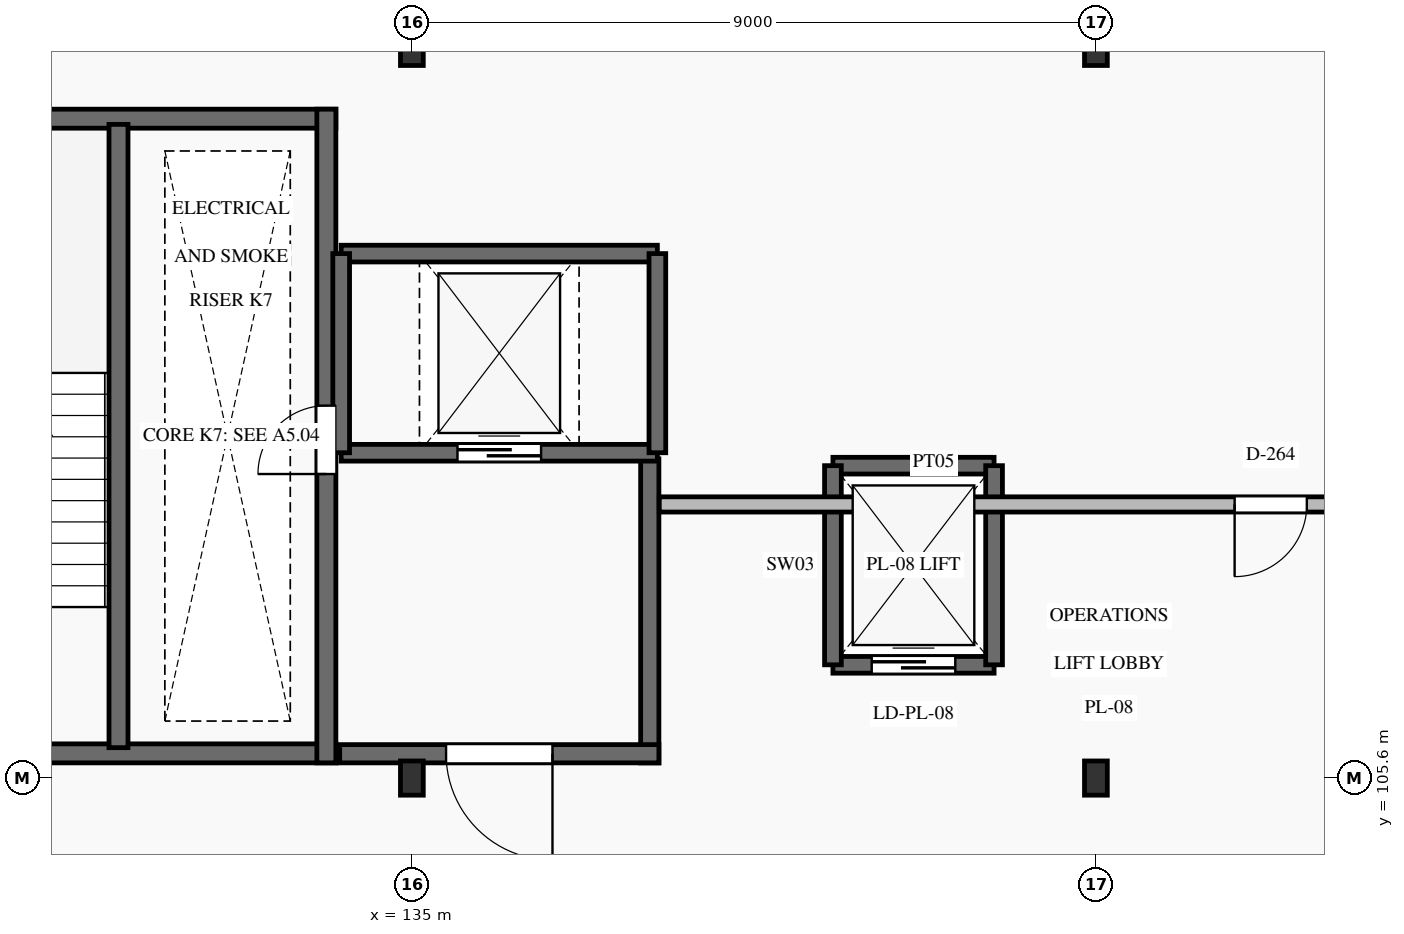
"""IFC4 building model, lengths in metres.
Left out: names, types, materials, properties, quantities, classifications, styles, units other than length and angle.
Written with IfcOpenShell. Run it as: python <this file> out.ifc"""

import sys

from ifc_helpers import new_model, si_unit, direction, frame, frame_2d, origin, origin_2d, place, context, subcontext, project, spatial, rectangle, i_section, extrude, element, fill, save


model = new_model("IFC4")
c1 = context("Model", 3, precision=1e-05, world=origin(), true_north=direction((0.0, 1.0)))
c2 = subcontext(c1, "Body", "Model", "MODEL_VIEW")
j1 = project(units=[si_unit("LENGTHUNIT", "METRE"), si_unit("PLANEANGLEUNIT", "RADIAN")], contexts=[c1])
p1 = place(None, origin())
s1 = spatial("IfcSite", under=j1, at=p1, CompositionType="ELEMENT")
p2 = place(p1, origin())
s2 = spatial("IfcBuilding", under=s1, at=p2, CompositionType="ELEMENT")
p3 = place(p2, frame((0.0, 0.0, 10.8)))
s3 = spatial("IfcBuildingStorey", under=s2, at=p3, CompositionType="ELEMENT", Elevation=10.8)
for number, where, z_axis, x_axis in (
    (1, (135.0, 105.6, 0.0), (0.0, 0.0, 1.0), (1.0, 0.0, 0.0)),
    (2, (135.0, 115.2, 0.0), (0.0, 0.0, 1.0), (1.0, 0.0, 0.0)),
    (3, (144.0, 105.6, 0.0), (0.0, 0.0, 1.0), (1.0, 0.0, 0.0)),
    (4, (144.0, 115.2, 0.0), (0.0, 0.0, 1.0), (1.0, 0.0, 0.0)),
):
    element("IfcColumn", number, at=place(p3, frame(where, z_axis=z_axis, x_axis=x_axis)), inside=s3, PredefinedType="COLUMN", context=c2, shape_type="SweptSolid", body=[
        extrude(i_section(OverallWidth=0.3, OverallDepth=0.45, WebThickness=0.014, FlangeThickness=0.026, FilletRadius=0.027, at=origin_2d()), origin(), (0.0, 0.0, 1.0), 4.2),
    ])
p4 = place(p3, frame((127.0, 105.925, 0.0), z_axis=(0.0, 0.0, 1.0), x_axis=(1.0, 0.0, 0.0)))
e5 = element("IfcWall", 5, at=p4, inside=s3, PredefinedType="SHEAR", context=c2, shape_type="SweptSolid", body=[
    extrude(rectangle(XDim=7.0, YDim=0.25, at=frame_2d((3.5, 0.0))), origin(), (0.0, 0.0, 1.0), 4.2),
])
p5 = place(p4, frame((1.25, 0.0, 0.0)))
e6 = element("IfcOpeningElement", 6, at=p5, cuts=e5, PredefinedType="OPENING", context=c2, shape_type="SweptSolid", body=[
    extrude(rectangle(XDim=1.2, YDim=2.15, at=frame_2d((0.6, 1.075))), frame((0.0, 0.14, 0.0), z_axis=(0.0, -1.0, 0.0), x_axis=(1.0, 0.0, 0.0)), (0.0, 0.0, 1.0), 0.28),
])
p6 = place(p3, frame((127.0, 114.275, 0.0), z_axis=(0.0, 0.0, 1.0), x_axis=(1.0, 0.0, 0.0)))
e7 = element("IfcWall", 7, at=p6, inside=s3, PredefinedType="SHEAR", context=c2, shape_type="SweptSolid", body=[
    extrude(rectangle(XDim=7.0, YDim=0.25, at=frame_2d((3.5, 0.0))), origin(), (0.0, 0.0, 1.0), 4.2),
])
p7 = place(p3, frame((133.875, 105.8, 0.0), z_axis=(0.0, 0.0, 1.0), x_axis=(0.0, 1.0, 0.0)))
e8 = element("IfcWall", 8, at=p7, inside=s3, PredefinedType="SHEAR", context=c2, shape_type="SweptSolid", body=[
    extrude(rectangle(XDim=8.6, YDim=0.25, at=frame_2d((4.3, 0.0))), origin(), (0.0, 0.0, 1.0), 4.2),
])
p8 = place(p7, frame((3.8, 0.0, 0.0)))
e9 = element("IfcOpeningElement", 9, at=p8, cuts=e8, PredefinedType="OPENING", context=c2, shape_type="SweptSolid", body=[
    extrude(rectangle(XDim=0.9, YDim=2.05, at=frame_2d((0.45, 1.025))), frame((0.0, 0.14, 0.0), z_axis=(0.0, -1.0, 0.0), x_axis=(1.0, 0.0, 0.0)), (0.0, 0.0, 1.0), 0.28),
])
p9 = place(p3, frame((131.14, 106.0, 0.0), z_axis=(0.0, 0.0, 1.0), x_axis=(0.0, 1.0, 0.0)))
e10 = element("IfcWall", 10, at=p9, inside=s3, PredefinedType="SHEAR", context=c2, shape_type="SweptSolid", body=[
    extrude(rectangle(XDim=8.2, YDim=0.25, at=frame_2d((4.1, 0.0))), origin(), (0.0, 0.0, 1.0), 4.2),
])
p10 = place(p3, frame((138.13, 105.8, 0.0), z_axis=(0.0, 0.0, 1.0), x_axis=(0.0, 1.0, 0.0)))
e11 = element("IfcWall", 11, at=p10, inside=s3, PredefinedType="SHEAR", context=c2, shape_type="SweptSolid", body=[
    extrude(rectangle(XDim=4.0, YDim=0.24, at=frame_2d((2.0, 0.0))), origin(), (0.0, 0.0, 1.0), 4.2),
])
p11 = place(p3, frame((134.05, 105.92, 0.0), z_axis=(0.0, 0.0, 1.0), x_axis=(1.0, 0.0, 0.0)))
e12 = element("IfcWall", 12, at=p11, inside=s3, PredefinedType="SHEAR", context=c2, shape_type="SweptSolid", body=[
    extrude(rectangle(XDim=4.2, YDim=0.24, at=frame_2d((2.1, 0.0))), origin(), (0.0, 0.0, 1.0), 4.2),
])
p12 = place(p11, frame((1.4, 0.0, 0.0)))
e13 = element("IfcOpeningElement", 13, at=p12, cuts=e12, PredefinedType="OPENING", context=c2, shape_type="SweptSolid", body=[
    extrude(rectangle(XDim=1.4, YDim=2.2, at=frame_2d((0.7, 1.1))), frame((0.0, 0.135, 0.0), z_axis=(0.0, -1.0, 0.0), x_axis=(1.0, 0.0, 0.0)), (0.0, 0.0, 1.0), 0.27),
])
p13 = place(p3, frame((140.54, 107.09, 0.0), z_axis=(0.0, 0.0, 1.0), x_axis=(1.0, 0.0, 0.0)))
e14 = element("IfcWall", 14, at=p13, inside=s3, PredefinedType="SHEAR", context=c2, shape_type="SweptSolid", body=[
    extrude(rectangle(XDim=2.12, YDim=0.22, at=frame_2d((1.06, 0.0))), origin(), (0.0, 0.0, 1.0), 4.2),
])
p14 = place(p13, frame((0.51, 0.0, 0.0)))
e15 = element("IfcOpeningElement", 15, at=p14, cuts=e14, PredefinedType="OPENING", context=c2, shape_type="SweptSolid", body=[
    extrude(rectangle(XDim=1.1, YDim=2.15, at=frame_2d((0.55, 1.075))), frame((0.0, 0.125, 0.0), z_axis=(0.0, -1.0, 0.0), x_axis=(1.0, 0.0, 0.0)), (0.0, 0.0, 1.0), 0.25),
])
p15 = place(p3, frame((140.54, 109.71, 0.0), z_axis=(0.0, 0.0, 1.0), x_axis=(1.0, 0.0, 0.0)))
e16 = element("IfcWall", 16, at=p15, inside=s3, PredefinedType="SHEAR", context=c2, shape_type="SweptSolid", body=[
    extrude(rectangle(XDim=2.12, YDim=0.22, at=frame_2d((1.06, 0.0))), origin(), (0.0, 0.0, 1.0), 4.2),
])
for number, where, z_axis, x_axis in (
    (17, (140.54, 107.09, 0.0), (0.0, 0.0, 1.0), (0.0, 1.0, 0.0)),
    (18, (142.66, 107.09, 0.0), (0.0, 0.0, 1.0), (0.0, 1.0, 0.0)),
):
    element("IfcWall", number, at=place(p3, frame(where, z_axis=z_axis, x_axis=x_axis)), inside=s3, PredefinedType="SHEAR", context=c2, shape_type="SweptSolid", body=[
        extrude(rectangle(XDim=2.62, YDim=0.22, at=frame_2d((1.31, 0.0))), origin(), (0.0, 0.0, 1.0), 4.2),
    ])
p16 = place(p3, frame((134.07, 109.88, 0.0), z_axis=(0.0, 0.0, 1.0), x_axis=(1.0, 0.0, 0.0)))
e19 = element("IfcWall", 19, at=p16, inside=s3, PredefinedType="SHEAR", context=c2, shape_type="SweptSolid", body=[
    extrude(rectangle(XDim=4.16, YDim=0.22, at=frame_2d((2.08, 0.0))), origin(), (0.0, 0.0, 1.0), 4.2),
])
p17 = place(p16, frame((1.53, 0.0, 0.0)))
e20 = element("IfcOpeningElement", 20, at=p17, cuts=e19, PredefinedType="OPENING", context=c2, shape_type="SweptSolid", body=[
    extrude(rectangle(XDim=1.1, YDim=2.15, at=frame_2d((0.55, 1.075))), frame((0.0, 0.125, 0.0), z_axis=(0.0, -1.0, 0.0), x_axis=(1.0, 0.0, 0.0)), (0.0, 0.0, 1.0), 0.25),
])
p18 = place(p3, frame((134.07, 112.5, 0.0), z_axis=(0.0, 0.0, 1.0), x_axis=(1.0, 0.0, 0.0)))
e21 = element("IfcWall", 21, at=p18, inside=s3, PredefinedType="SHEAR", context=c2, shape_type="SweptSolid", body=[
    extrude(rectangle(XDim=4.16, YDim=0.22, at=frame_2d((2.08, 0.0))), origin(), (0.0, 0.0, 1.0), 4.2),
])
for number, where, z_axis, x_axis in (
    (22, (134.07, 109.88, 0.0), (0.0, 0.0, 1.0), (0.0, 1.0, 0.0)),
    (23, (138.23, 109.88, 0.0), (0.0, 0.0, 1.0), (0.0, 1.0, 0.0)),
):
    element("IfcWall", number, at=place(p3, frame(where, z_axis=z_axis, x_axis=x_axis)), inside=s3, PredefinedType="SHEAR", context=c2, shape_type="SweptSolid", body=[
        extrude(rectangle(XDim=2.62, YDim=0.22, at=frame_2d((1.31, 0.0))), origin(), (0.0, 0.0, 1.0), 4.2),
    ])
p19 = place(p3, frame((138.255, 109.2, 0.0), z_axis=(0.0, 0.0, 1.0), x_axis=(1.0, 0.0, 0.0)))
e24 = element("IfcWall", 24, at=p19, inside=s3, PredefinedType="PARTITIONING", context=c2, shape_type="SweptSolid", body=[
    extrude(rectangle(XDim=15.54, YDim=0.2, at=frame_2d((7.77, 0.0))), origin(), (0.0, 0.0, 1.0), 3.94),
])
p20 = place(p19, frame((7.57, 0.0, 0.0)))
e25 = element("IfcOpeningElement", 25, at=p20, cuts=e24, PredefinedType="OPENING", context=c2, shape_type="SweptSolid", body=[
    extrude(rectangle(XDim=0.95, YDim=2.1, at=frame_2d((0.475, 1.05))), frame((0.0, 0.115, 0.0), z_axis=(0.0, -1.0, 0.0), x_axis=(1.0, 0.0, 0.0)), (0.0, 0.0, 1.0), 0.23),
])
p21 = place(p8, origin())
e26 = element("IfcDoor", 26, at=p21, inside=s3, OperationType="SINGLE_SWING_LEFT", PredefinedType="DOOR", context=c2, shape_type="SweptSolid", body=[
    extrude(rectangle(XDim=0.9, YDim=2.05, at=frame_2d((0.45, 1.025))), frame((0.0, 0.025, 0.0), z_axis=(0.0, -1.0, 0.0), x_axis=(1.0, 0.0, 0.0)), (0.0, 0.0, 1.0), 0.05),
])
fill(e9, e26)
p22 = place(p12, frame((1.4, 0.0, 0.0), z_axis=(0.0, 0.0, 1.0), x_axis=(-1.0, 0.0, 0.0)))
e27 = element("IfcDoor", 27, at=p22, inside=s3, OperationType="SINGLE_SWING_RIGHT", PredefinedType="DOOR", context=c2, shape_type="SweptSolid", body=[
    extrude(rectangle(XDim=1.4, YDim=2.2, at=frame_2d((0.7, 1.1))), frame((0.0, 0.025, 0.0), z_axis=(0.0, -1.0, 0.0), x_axis=(1.0, 0.0, 0.0)), (0.0, 0.0, 1.0), 0.05),
])
fill(e13, e27)
p23 = place(p14, origin())
e28 = element("IfcDoor", 28, at=p23, inside=s3, OperationType="SLIDING_TO_LEFT", PredefinedType="DOOR", context=c2, shape_type="SweptSolid", body=[
    extrude(rectangle(XDim=1.1, YDim=2.15, at=frame_2d((0.55, 1.075))), frame((0.0, 0.025, 0.0), z_axis=(0.0, -1.0, 0.0), x_axis=(1.0, 0.0, 0.0)), (0.0, 0.0, 1.0), 0.05),
])
fill(e15, e28)
p24 = place(p17, origin())
e29 = element("IfcDoor", 29, at=p24, inside=s3, OperationType="SLIDING_TO_LEFT", PredefinedType="DOOR", context=c2, shape_type="SweptSolid", body=[
    extrude(rectangle(XDim=1.1, YDim=2.15, at=frame_2d((0.55, 1.075))), frame((0.0, 0.025, 0.0), z_axis=(0.0, -1.0, 0.0), x_axis=(1.0, 0.0, 0.0)), (0.0, 0.0, 1.0), 0.05),
])
fill(e20, e29)
p25 = place(p20, frame((0.95, 0.0, 0.0), z_axis=(0.0, 0.0, 1.0), x_axis=(-1.0, 0.0, 0.0)))
e30 = element("IfcDoor", 30, at=p25, inside=s3, OperationType="SINGLE_SWING_LEFT", PredefinedType="DOOR", context=c2, shape_type="SweptSolid", body=[
    extrude(rectangle(XDim=0.95, YDim=2.1, at=frame_2d((0.475, 1.05))), frame((0.0, 0.025, 0.0), z_axis=(0.0, -1.0, 0.0), x_axis=(1.0, 0.0, 0.0)), (0.0, 0.0, 1.0), 0.05),
])
fill(e25, e30)
save(model, sys.argv[1])
